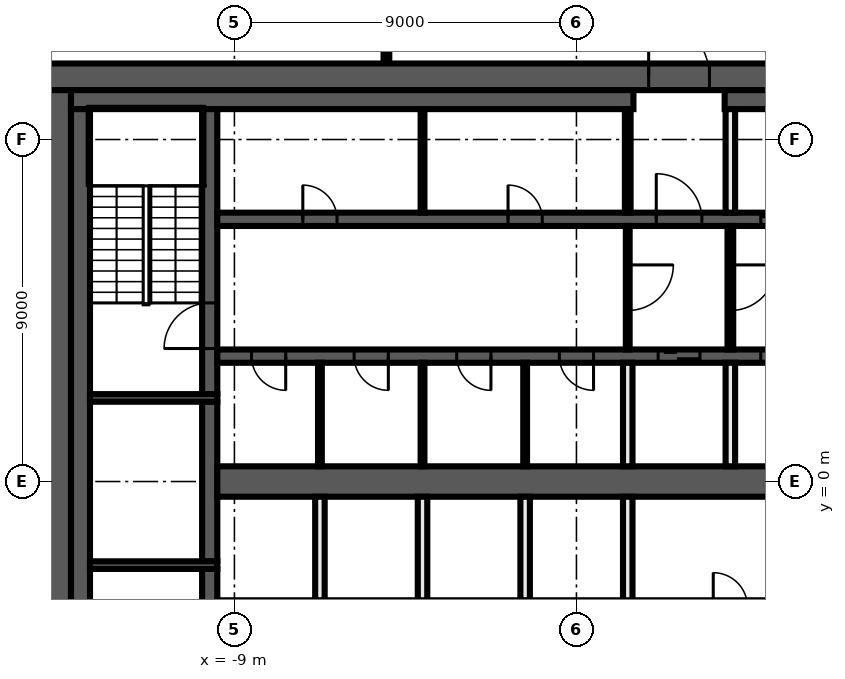
"""IFC4 building model, lengths in metres.
Left out: names, types, materials, properties, quantities, classifications, styles, units other than length and angle.
Written with IfcOpenShell. Run it as: python <this file> out.ifc"""

import sys

from ifc_helpers import new_model, si_unit, direction, frame, frame_2d, origin, place, context, subcontext, project, spatial, rectangle, extrude, element, fill, save


model = new_model("IFC4")
c1 = context("Model", 3, precision=1e-05, world=origin(), true_north=direction((0.0, 1.0)))
c2 = subcontext(c1, "Body", "Model", "MODEL_VIEW")
j1 = project(units=[si_unit("LENGTHUNIT", "METRE"), si_unit("PLANEANGLEUNIT", "RADIAN")], contexts=[c1])
p1 = place(None, origin())
s1 = spatial("IfcSite", under=j1, at=p1, CompositionType="ELEMENT")
p2 = place(p1, origin())
s2 = spatial("IfcBuilding", under=s1, at=p2, CompositionType="ELEMENT")
p3 = place(p2, frame((0.0, 0.0, 266.4)))
s3 = spatial("IfcBuildingStorey", under=s2, at=p3, CompositionType="ELEMENT", Elevation=266.4)
p4 = place(p3, frame((-5.0, 11.0, 0.0), z_axis=(0.0, 0.0, 1.0), x_axis=(0.0, 1.0, 0.0)))
e1 = element("IfcWall", 1, at=p4, inside=s3, PredefinedType="PARTITIONING", context=c2, shape_type="SweptSolid", body=[
    extrude(rectangle(XDim=3.125, YDim=0.15, at=frame_2d((1.562, 0.0))), origin(), (0.0, 0.0, 1.0), 3.82),
])
p5 = place(p3, frame((-14.0, 10.65, 0.0), z_axis=(0.0, 0.0, 1.0), x_axis=(1.0, 0.0, 0.0)))
e2 = element("IfcWall", 2, at=p5, inside=s3, PredefinedType="SHEAR", context=c2, shape_type="SweptSolid", body=[
    extrude(rectangle(XDim=28.0, YDim=0.7, at=frame_2d((14.0, 0.0))), origin(), (0.0, 0.0, 1.0), 3.82),
])
p6 = place(p5, frame((15.9, 0.0, 0.0)))
e3 = element("IfcOpeningElement", 3, at=p6, cuts=e2, PredefinedType="OPENING", context=c2, shape_type="SweptSolid", body=[
    extrude(rectangle(XDim=1.6, YDim=2.1, at=frame_2d((0.8, 1.05))), frame((0.0, 0.36, 0.0), z_axis=(0.0, -1.0, 0.0), x_axis=(1.0, 0.0, 0.0)), (0.0, 0.0, 1.0), 0.72),
])
p7 = place(p3, frame((-13.65, -10.3, 0.0), z_axis=(0.0, 0.0, 1.0), x_axis=(0.0, 1.0, 0.0)))
e4 = element("IfcWall", 4, at=p7, inside=s3, PredefinedType="SHEAR", context=c2, shape_type="SweptSolid", body=[
    extrude(rectangle(XDim=20.6, YDim=0.7, at=frame_2d((10.3, 0.0))), origin(), (0.0, 0.0, 1.0), 3.82),
])
p8 = place(p3, frame((-13.3, 10.05, 0.0), z_axis=(0.0, 0.0, 1.0), x_axis=(1.0, 0.0, 0.0)))
e5 = element("IfcWall", 5, at=p8, inside=s3, PredefinedType="SHEAR", context=c2, shape_type="SweptSolid", body=[
    extrude(rectangle(XDim=14.8, YDim=0.5, at=frame_2d((7.4, 0.0))), origin(), (0.0, 0.0, 1.0), 3.82),
])
p9 = place(p3, frame((3.9, 10.05, 0.0), z_axis=(0.0, 0.0, 1.0), x_axis=(1.0, 0.0, 0.0)))
e6 = element("IfcWall", 6, at=p9, inside=s3, PredefinedType="SHEAR", context=c2, shape_type="SweptSolid", body=[
    extrude(rectangle(XDim=9.4, YDim=0.5, at=frame_2d((4.7, 0.0))), origin(), (0.0, 0.0, 1.0), 3.82),
])
p10 = place(p3, frame((-13.05, -9.8, 0.0), z_axis=(0.0, 0.0, 1.0), x_axis=(0.0, 1.0, 0.0)))
e7 = element("IfcWall", 7, at=p10, inside=s3, PredefinedType="SHEAR", context=c2, shape_type="SweptSolid", body=[
    extrude(rectangle(XDim=19.6, YDim=0.5, at=frame_2d((9.8, 0.0))), origin(), (0.0, 0.0, 1.0), 3.82),
])
p11 = place(p3, frame((-9.65, -9.8, 0.0), z_axis=(0.0, 0.0, 1.0), x_axis=(0.0, 1.0, 0.0)))
e8 = element("IfcWall", 8, at=p11, inside=s3, PredefinedType="SHEAR", context=c2, shape_type="SweptSolid", body=[
    extrude(rectangle(XDim=7.5, YDim=0.4, at=frame_2d((3.75, 0.0))), origin(), (0.0, 0.0, 1.0), 3.82),
])
p12 = place(p11, frame((5.1, 0.0, 0.0)))
e9 = element("IfcOpeningElement", 9, at=p12, cuts=e8, PredefinedType="OPENING", context=c2, shape_type="SweptSolid", body=[
    extrude(rectangle(XDim=1.2, YDim=2.1, at=frame_2d((0.6, 1.05))), frame((0.0, 0.21, 0.0), z_axis=(0.0, -1.0, 0.0), x_axis=(1.0, 0.0, 0.0)), (0.0, 0.0, 1.0), 0.42),
])
p13 = place(p3, frame((-9.65, -2.1, 0.0), z_axis=(0.0, 0.0, 1.0), x_axis=(0.0, 1.0, 0.0)))
e10 = element("IfcWall", 10, at=p13, inside=s3, PredefinedType="SHEAR", context=c2, shape_type="SweptSolid", body=[
    extrude(rectangle(XDim=4.2, YDim=0.4, at=frame_2d((2.1, 0.0))), origin(), (0.0, 0.0, 1.0), 3.82),
])
p14 = place(p3, frame((-9.65, 2.3, 0.0), z_axis=(0.0, 0.0, 1.0), x_axis=(0.0, 1.0, 0.0)))
e11 = element("IfcWall", 11, at=p14, inside=s3, PredefinedType="SHEAR", context=c2, shape_type="SweptSolid", body=[
    extrude(rectangle(XDim=7.5, YDim=0.4, at=frame_2d((3.75, 0.0))), origin(), (0.0, 0.0, 1.0), 3.82),
])
p15 = place(p14, frame((1.2, 0.0, 0.0)))
e12 = element("IfcOpeningElement", 12, at=p15, cuts=e11, PredefinedType="OPENING", context=c2, shape_type="SweptSolid", body=[
    extrude(rectangle(XDim=1.2, YDim=2.1, at=frame_2d((0.6, 1.05))), frame((0.0, 0.21, 0.0), z_axis=(0.0, -1.0, 0.0), x_axis=(1.0, 0.0, 0.0)), (0.0, 0.0, 1.0), 0.42),
])
for number, where, z_axis, x_axis in (
    (13, (-9.45, 2.2, 0.0), (0.0, 0.0, 1.0), (-1.0, 0.0, 0.0)),
    (14, (-9.45, -2.2, 0.0), (0.0, 0.0, 1.0), (-1.0, 0.0, 0.0)),
):
    element("IfcWall", number, at=place(p3, frame(where, z_axis=z_axis, x_axis=x_axis)), inside=s3, PredefinedType="SHEAR", context=c2, shape_type="SweptSolid", body=[
        extrude(rectangle(XDim=3.35, YDim=0.2, at=frame_2d((1.675, 0.0))), origin(), (0.0, 0.0, 1.0), 3.82),
    ])
p16 = place(p3, frame((-9.45, 6.9, 0.0), z_axis=(0.0, 0.0, 1.0), x_axis=(1.0, 0.0, 0.0)))
e15 = element("IfcWall", 15, at=p16, inside=s3, PredefinedType="SHEAR", context=c2, shape_type="SweptSolid", body=[
    extrude(rectangle(XDim=18.9, YDim=0.35, at=frame_2d((9.45, 0.0))), origin(), (0.0, 0.0, 1.0), 3.82),
])
p17 = place(p16, frame((11.55, 0.0, 0.0)))
e16 = element("IfcOpeningElement", 16, at=p17, cuts=e15, PredefinedType="OPENING", context=c2, shape_type="SweptSolid", body=[
    extrude(rectangle(XDim=1.2, YDim=2.1, at=frame_2d((0.6, 1.05))), frame((0.0, 0.185, 0.0), z_axis=(0.0, -1.0, 0.0), x_axis=(1.0, 0.0, 0.0)), (0.0, 0.0, 1.0), 0.37),
])
p18 = place(p16, frame((14.3, 0.0, 0.0)))
e17 = element("IfcOpeningElement", 17, at=p18, cuts=e15, PredefinedType="OPENING", context=c2, shape_type="SweptSolid", body=[
    extrude(rectangle(XDim=1.1, YDim=2.1, at=frame_2d((0.55, 1.05))), frame((0.0, 0.185, 0.0), z_axis=(0.0, -1.0, 0.0), x_axis=(1.0, 0.0, 0.0)), (0.0, 0.0, 1.0), 0.37),
])
p19 = place(p16, frame((17.0, 0.0, 0.0)))
e18 = element("IfcOpeningElement", 18, at=p19, cuts=e15, PredefinedType="OPENING", context=c2, shape_type="SweptSolid", body=[
    extrude(rectangle(XDim=1.1, YDim=2.1, at=frame_2d((0.55, 1.05))), frame((0.0, 0.185, 0.0), z_axis=(0.0, -1.0, 0.0), x_axis=(1.0, 0.0, 0.0)), (0.0, 0.0, 1.0), 0.37),
])
p20 = place(p16, frame((2.25, 0.0, 0.0)))
e19 = element("IfcOpeningElement", 19, at=p20, cuts=e15, PredefinedType="OPENING", context=c2, shape_type="SweptSolid", body=[
    extrude(rectangle(XDim=0.9, YDim=2.1, at=frame_2d((0.45, 1.05))), frame((0.0, 0.185, 0.0), z_axis=(0.0, -1.0, 0.0), x_axis=(1.0, 0.0, 0.0)), (0.0, 0.0, 1.0), 0.37),
])
p21 = place(p16, frame((7.65, 0.0, 0.0)))
e20 = element("IfcOpeningElement", 20, at=p21, cuts=e15, PredefinedType="OPENING", context=c2, shape_type="SweptSolid", body=[
    extrude(rectangle(XDim=0.9, YDim=2.1, at=frame_2d((0.45, 1.05))), frame((0.0, 0.185, 0.0), z_axis=(0.0, -1.0, 0.0), x_axis=(1.0, 0.0, 0.0)), (0.0, 0.0, 1.0), 0.37),
])
p22 = place(p3, frame((9.45, 3.3, 0.0), z_axis=(0.0, 0.0, 1.0), x_axis=(-1.0, 0.0, 0.0)))
e21 = element("IfcWall", 21, at=p22, inside=s3, PredefinedType="SHEAR", context=c2, shape_type="SweptSolid", body=[
    extrude(rectangle(XDim=18.9, YDim=0.35, at=frame_2d((9.45, 0.0))), origin(), (0.0, 0.0, 1.0), 3.82),
])
p23 = place(p22, frame((6.2, 0.0, 0.0)))
e22 = element("IfcOpeningElement", 22, at=p23, cuts=e21, PredefinedType="OPENING", context=c2, shape_type="SweptSolid", body=[
    extrude(rectangle(XDim=1.1, YDim=2.1, at=frame_2d((0.55, 1.05))), frame((0.0, 0.185, 0.0), z_axis=(0.0, -1.0, 0.0), x_axis=(1.0, 0.0, 0.0)), (0.0, 0.0, 1.0), 0.37),
])
p24 = place(p22, frame((3.5, 0.0, 0.0)))
e23 = element("IfcOpeningElement", 23, at=p24, cuts=e21, PredefinedType="OPENING", context=c2, shape_type="SweptSolid", body=[
    extrude(rectangle(XDim=1.1, YDim=2.1, at=frame_2d((0.55, 1.05))), frame((0.0, 0.185, 0.0), z_axis=(0.0, -1.0, 0.0), x_axis=(1.0, 0.0, 0.0)), (0.0, 0.0, 1.0), 0.37),
])
p25 = place(p22, frame((0.9, 0.0, 0.0)))
e24 = element("IfcOpeningElement", 24, at=p25, cuts=e21, PredefinedType="OPENING", context=c2, shape_type="SweptSolid", body=[
    extrude(rectangle(XDim=0.9, YDim=2.1, at=frame_2d((0.45, 1.05))), frame((0.0, 0.185, 0.0), z_axis=(0.0, -1.0, 0.0), x_axis=(1.0, 0.0, 0.0)), (0.0, 0.0, 1.0), 0.37),
])
p26 = place(p22, frame((17.1, 0.0, 0.0)))
e25 = element("IfcOpeningElement", 25, at=p26, cuts=e21, PredefinedType="OPENING", context=c2, shape_type="SweptSolid", body=[
    extrude(rectangle(XDim=0.9, YDim=2.1, at=frame_2d((0.45, 1.05))), frame((0.0, 0.185, 0.0), z_axis=(0.0, -1.0, 0.0), x_axis=(1.0, 0.0, 0.0)), (0.0, 0.0, 1.0), 0.37),
])
p27 = place(p22, frame((14.4, 0.0, 0.0)))
e26 = element("IfcOpeningElement", 26, at=p27, cuts=e21, PredefinedType="OPENING", context=c2, shape_type="SweptSolid", body=[
    extrude(rectangle(XDim=0.9, YDim=2.1, at=frame_2d((0.45, 1.05))), frame((0.0, 0.185, 0.0), z_axis=(0.0, -1.0, 0.0), x_axis=(1.0, 0.0, 0.0)), (0.0, 0.0, 1.0), 0.37),
])
p28 = place(p22, frame((11.7, 0.0, 0.0)))
e27 = element("IfcOpeningElement", 27, at=p28, cuts=e21, PredefinedType="OPENING", context=c2, shape_type="SweptSolid", body=[
    extrude(rectangle(XDim=0.9, YDim=2.1, at=frame_2d((0.45, 1.05))), frame((0.0, 0.185, 0.0), z_axis=(0.0, -1.0, 0.0), x_axis=(1.0, 0.0, 0.0)), (0.0, 0.0, 1.0), 0.37),
])
p29 = place(p22, frame((9.0, 0.0, 0.0)))
e28 = element("IfcOpeningElement", 28, at=p29, cuts=e21, PredefinedType="OPENING", context=c2, shape_type="SweptSolid", body=[
    extrude(rectangle(XDim=0.9, YDim=2.1, at=frame_2d((0.45, 1.05))), frame((0.0, 0.185, 0.0), z_axis=(0.0, -1.0, 0.0), x_axis=(1.0, 0.0, 0.0)), (0.0, 0.0, 1.0), 0.37),
])
p30 = place(p3, frame((-9.45, 0.0, 0.0), z_axis=(0.0, 0.0, 1.0), x_axis=(1.0, 0.0, 0.0)))
e29 = element("IfcWall", 29, at=p30, inside=s3, PredefinedType="SHEAR", context=c2, shape_type="SweptSolid", body=[
    extrude(rectangle(XDim=18.9, YDim=0.8, at=frame_2d((9.45, 0.0))), origin(), (0.0, 0.0, 1.0), 3.82),
])
p31 = place(p3, frame((4.05, 6.725, 0.0), z_axis=(0.0, 0.0, 1.0), x_axis=(0.0, -1.0, 0.0)))
e30 = element("IfcWall", 30, at=p31, inside=s3, PredefinedType="PARTITIONING", context=c2, shape_type="SweptSolid", body=[
    extrude(rectangle(XDim=3.25, YDim=0.15, at=frame_2d((1.625, 0.0))), origin(), (0.0, 0.0, 1.0), 3.82),
])
p32 = place(p31, frame((1.025, 0.0, 0.0)))
e31 = element("IfcOpeningElement", 31, at=p32, cuts=e30, PredefinedType="OPENING", context=c2, shape_type="SweptSolid", body=[
    extrude(rectangle(XDim=1.2, YDim=2.1, at=frame_2d((0.6, 1.05))), frame((0.0, 0.085, 0.0), z_axis=(0.0, -1.0, 0.0), x_axis=(1.0, 0.0, 0.0)), (0.0, 0.0, 1.0), 0.17),
])
for number, where, z_axis, x_axis in (
    (32, (4.05, 0.4, 0.0), (0.0, 0.0, 1.0), (0.0, 1.0, 0.0)),
    (33, (4.05, 7.075, 0.0), (0.0, 0.0, 1.0), (0.0, 1.0, 0.0)),
):
    element("IfcWall", number, at=place(p3, frame(where, z_axis=z_axis, x_axis=x_axis)), inside=s3, PredefinedType="SOLIDWALL", context=c2, shape_type="SweptSolid", body=[
        extrude(rectangle(XDim=2.725, YDim=0.25, at=frame_2d((1.363, 0.0))), origin(), (0.0, 0.0, 1.0), 3.82),
    ])
p33 = place(p3, frame((1.35, 7.075, 0.0), z_axis=(0.0, 0.0, 1.0), x_axis=(0.0, 1.0, 0.0)))
e34 = element("IfcWall", 34, at=p33, inside=s3, PredefinedType="PARTITIONING", context=c2, shape_type="SweptSolid", body=[
    extrude(rectangle(XDim=2.725, YDim=0.15, at=frame_2d((1.363, 0.0))), origin(), (0.0, 0.0, 1.0), 3.82),
])
p34 = place(p3, frame((1.35, 6.725, 0.0), z_axis=(0.0, 0.0, 1.0), x_axis=(0.0, -1.0, 0.0)))
e35 = element("IfcWall", 35, at=p34, inside=s3, PredefinedType="PARTITIONING", context=c2, shape_type="SweptSolid", body=[
    extrude(rectangle(XDim=3.25, YDim=0.1, at=frame_2d((1.625, 0.0))), origin(), (0.0, 0.0, 1.0), 3.82),
])
p35 = place(p34, frame((1.025, 0.0, 0.0)))
e36 = element("IfcOpeningElement", 36, at=p35, cuts=e35, PredefinedType="OPENING", context=c2, shape_type="SweptSolid", body=[
    extrude(rectangle(XDim=1.2, YDim=2.1, at=frame_2d((0.6, 1.05))), frame((0.0, 0.06, 0.0), z_axis=(0.0, -1.0, 0.0), x_axis=(1.0, 0.0, 0.0)), (0.0, 0.0, 1.0), 0.12),
])
for number, where, z_axis, x_axis in (
    (37, (1.35, -3.125, 0.0), (0.0, 0.0, 1.0), (0.0, 1.0, 0.0)),
    (38, (1.35, 0.4, 0.0), (0.0, 0.0, 1.0), (0.0, 1.0, 0.0)),
):
    element("IfcWall", number, at=place(p3, frame(where, z_axis=z_axis, x_axis=x_axis)), inside=s3, PredefinedType="SOLIDWALL", context=c2, shape_type="SweptSolid", body=[
        extrude(rectangle(XDim=2.725, YDim=0.25, at=frame_2d((1.363, 0.0))), origin(), (0.0, 0.0, 1.0), 3.82),
    ])
p36 = place(p3, frame((-1.35, 0.4, 0.0), z_axis=(0.0, 0.0, 1.0), x_axis=(0.0, 1.0, 0.0)))
e39 = element("IfcWall", 39, at=p36, inside=s3, PredefinedType="PARTITIONING", context=c2, shape_type="SweptSolid", body=[
    extrude(rectangle(XDim=2.725, YDim=0.1, at=frame_2d((1.363, 0.0))), origin(), (0.0, 0.0, 1.0), 3.82),
])
p37 = place(p3, frame((-1.35, -3.125, 0.0), z_axis=(0.0, 0.0, 1.0), x_axis=(0.0, 1.0, 0.0)))
e40 = element("IfcWall", 40, at=p37, inside=s3, PredefinedType="SOLIDWALL", context=c2, shape_type="SweptSolid", body=[
    extrude(rectangle(XDim=2.725, YDim=0.25, at=frame_2d((1.363, 0.0))), origin(), (0.0, 0.0, 1.0), 3.82),
])
for number, where, z_axis, x_axis in (
    (41, (-4.05, 0.4, 0.0), (0.0, 0.0, 1.0), (0.0, 1.0, 0.0)),
    (42, (-4.05, 7.075, 0.0), (0.0, 0.0, 1.0), (0.0, 1.0, 0.0)),
):
    element("IfcWall", number, at=place(p3, frame(where, z_axis=z_axis, x_axis=x_axis)), inside=s3, PredefinedType="PARTITIONING", context=c2, shape_type="SweptSolid", body=[
        extrude(rectangle(XDim=2.725, YDim=0.1, at=frame_2d((1.363, 0.0))), origin(), (0.0, 0.0, 1.0), 3.82),
    ])
p38 = place(p3, frame((-4.05, -3.125, 0.0), z_axis=(0.0, 0.0, 1.0), x_axis=(0.0, 1.0, 0.0)))
e43 = element("IfcWall", 43, at=p38, inside=s3, PredefinedType="SOLIDWALL", context=c2, shape_type="SweptSolid", body=[
    extrude(rectangle(XDim=2.725, YDim=0.25, at=frame_2d((1.363, 0.0))), origin(), (0.0, 0.0, 1.0), 3.82),
])
p39 = place(p3, frame((-6.75, 0.4, 0.0), z_axis=(0.0, 0.0, 1.0), x_axis=(0.0, 1.0, 0.0)))
e44 = element("IfcWall", 44, at=p39, inside=s3, PredefinedType="PARTITIONING", context=c2, shape_type="SweptSolid", body=[
    extrude(rectangle(XDim=2.725, YDim=0.1, at=frame_2d((1.363, 0.0))), origin(), (0.0, 0.0, 1.0), 3.82),
])
p40 = place(p3, frame((-6.75, -3.125, 0.0), z_axis=(0.0, 0.0, 1.0), x_axis=(0.0, 1.0, 0.0)))
e45 = element("IfcWall", 45, at=p40, inside=s3, PredefinedType="SOLIDWALL", context=c2, shape_type="SweptSolid", body=[
    extrude(rectangle(XDim=2.725, YDim=0.25, at=frame_2d((1.363, 0.0))), origin(), (0.0, 0.0, 1.0), 3.82),
])
p41 = place(p6, origin())
e46 = element("IfcDoor", 46, at=p41, inside=s3, OperationType="DOUBLE_DOOR_SINGLE_SWING", PredefinedType="DOOR", context=c2, shape_type="SweptSolid", body=[
    extrude(rectangle(XDim=1.6, YDim=2.1, at=frame_2d((0.8, 1.05))), frame((0.0, 0.025, 0.0), z_axis=(0.0, -1.0, 0.0), x_axis=(1.0, 0.0, 0.0)), (0.0, 0.0, 1.0), 0.05),
])
fill(e3, e46)
p42 = place(p17, origin())
e47 = element("IfcDoor", 47, at=p42, inside=s3, OperationType="SINGLE_SWING_LEFT", PredefinedType="DOOR", context=c2, shape_type="SweptSolid", body=[
    extrude(rectangle(XDim=1.2, YDim=2.1, at=frame_2d((0.6, 1.05))), frame((0.0, 0.025, 0.0), z_axis=(0.0, -1.0, 0.0), x_axis=(1.0, 0.0, 0.0)), (0.0, 0.0, 1.0), 0.05),
])
fill(e16, e47)
p43 = place(p18, origin())
e48 = element("IfcDoor", 48, at=p43, inside=s3, OperationType="DOUBLE_DOOR_SLIDING", PredefinedType="DOOR", context=c2, shape_type="SweptSolid", body=[
    extrude(rectangle(XDim=1.1, YDim=2.1, at=frame_2d((0.55, 1.05))), frame((0.0, 0.025, 0.0), z_axis=(0.0, -1.0, 0.0), x_axis=(1.0, 0.0, 0.0)), (0.0, 0.0, 1.0), 0.05),
])
fill(e17, e48)
p44 = place(p23, origin())
e49 = element("IfcDoor", 49, at=p44, inside=s3, OperationType="DOUBLE_DOOR_SLIDING", PredefinedType="DOOR", context=c2, shape_type="SweptSolid", body=[
    extrude(rectangle(XDim=1.1, YDim=2.1, at=frame_2d((0.55, 1.05))), frame((0.0, 0.025, 0.0), z_axis=(0.0, -1.0, 0.0), x_axis=(1.0, 0.0, 0.0)), (0.0, 0.0, 1.0), 0.05),
])
fill(e22, e49)
p45 = place(p24, origin())
e50 = element("IfcDoor", 50, at=p45, inside=s3, OperationType="DOUBLE_DOOR_SLIDING", PredefinedType="DOOR", context=c2, shape_type="SweptSolid", body=[
    extrude(rectangle(XDim=1.1, YDim=2.1, at=frame_2d((0.55, 1.05))), frame((0.0, 0.025, 0.0), z_axis=(0.0, -1.0, 0.0), x_axis=(1.0, 0.0, 0.0)), (0.0, 0.0, 1.0), 0.05),
])
fill(e23, e50)
p46 = place(p20, origin())
e51 = element("IfcDoor", 51, at=p46, inside=s3, OperationType="SINGLE_SWING_RIGHT", PredefinedType="DOOR", context=c2, shape_type="SweptSolid", body=[
    extrude(rectangle(XDim=0.9, YDim=2.1, at=frame_2d((0.45, 1.05))), frame((0.0, 0.025, 0.0), z_axis=(0.0, -1.0, 0.0), x_axis=(1.0, 0.0, 0.0)), (0.0, 0.0, 1.0), 0.05),
])
fill(e19, e51)
p47 = place(p21, origin())
e52 = element("IfcDoor", 52, at=p47, inside=s3, OperationType="SINGLE_SWING_LEFT", PredefinedType="DOOR", context=c2, shape_type="SweptSolid", body=[
    extrude(rectangle(XDim=0.9, YDim=2.1, at=frame_2d((0.45, 1.05))), frame((0.0, 0.025, 0.0), z_axis=(0.0, -1.0, 0.0), x_axis=(1.0, 0.0, 0.0)), (0.0, 0.0, 1.0), 0.05),
])
fill(e20, e52)
p48 = place(p26, origin())
e53 = element("IfcDoor", 53, at=p48, inside=s3, OperationType="SINGLE_SWING_RIGHT", PredefinedType="DOOR", context=c2, shape_type="SweptSolid", body=[
    extrude(rectangle(XDim=0.9, YDim=2.1, at=frame_2d((0.45, 1.05))), frame((0.0, 0.025, 0.0), z_axis=(0.0, -1.0, 0.0), x_axis=(1.0, 0.0, 0.0)), (0.0, 0.0, 1.0), 0.05),
])
fill(e25, e53)
p49 = place(p27, origin())
e54 = element("IfcDoor", 54, at=p49, inside=s3, OperationType="SINGLE_SWING_LEFT", PredefinedType="DOOR", context=c2, shape_type="SweptSolid", body=[
    extrude(rectangle(XDim=0.9, YDim=2.1, at=frame_2d((0.45, 1.05))), frame((0.0, 0.025, 0.0), z_axis=(0.0, -1.0, 0.0), x_axis=(1.0, 0.0, 0.0)), (0.0, 0.0, 1.0), 0.05),
])
fill(e26, e54)
p50 = place(p28, origin())
e55 = element("IfcDoor", 55, at=p50, inside=s3, OperationType="SINGLE_SWING_RIGHT", PredefinedType="DOOR", context=c2, shape_type="SweptSolid", body=[
    extrude(rectangle(XDim=0.9, YDim=2.1, at=frame_2d((0.45, 1.05))), frame((0.0, 0.025, 0.0), z_axis=(0.0, -1.0, 0.0), x_axis=(1.0, 0.0, 0.0)), (0.0, 0.0, 1.0), 0.05),
])
fill(e27, e55)
p51 = place(p29, origin())
e56 = element("IfcDoor", 56, at=p51, inside=s3, OperationType="SINGLE_SWING_LEFT", PredefinedType="DOOR", context=c2, shape_type="SweptSolid", body=[
    extrude(rectangle(XDim=0.9, YDim=2.1, at=frame_2d((0.45, 1.05))), frame((0.0, 0.025, 0.0), z_axis=(0.0, -1.0, 0.0), x_axis=(1.0, 0.0, 0.0)), (0.0, 0.0, 1.0), 0.05),
])
fill(e28, e56)
p52 = place(p15, origin())
e57 = element("IfcDoor", 57, at=p52, inside=s3, OperationType="SINGLE_SWING_RIGHT", PredefinedType="DOOR", context=c2, shape_type="SweptSolid", body=[
    extrude(rectangle(XDim=1.2, YDim=2.1, at=frame_2d((0.6, 1.05))), frame((0.0, 0.025, 0.0), z_axis=(0.0, -1.0, 0.0), x_axis=(1.0, 0.0, 0.0)), (0.0, 0.0, 1.0), 0.05),
])
fill(e12, e57)
p53 = place(p35, origin())
e58 = element("IfcDoor", 58, at=p53, inside=s3, OperationType="SINGLE_SWING_LEFT", PredefinedType="DOOR", context=c2, shape_type="SweptSolid", body=[
    extrude(rectangle(XDim=1.2, YDim=2.1, at=frame_2d((0.6, 1.05))), frame((0.0, 0.025, 0.0), z_axis=(0.0, -1.0, 0.0), x_axis=(1.0, 0.0, 0.0)), (0.0, 0.0, 1.0), 0.05),
])
fill(e36, e58)
p54 = place(p32, origin())
e59 = element("IfcDoor", 59, at=p54, inside=s3, OperationType="SINGLE_SWING_RIGHT", PredefinedType="DOOR", context=c2, shape_type="SweptSolid", body=[
    extrude(rectangle(XDim=1.2, YDim=2.1, at=frame_2d((0.6, 1.05))), frame((0.0, 0.025, 0.0), z_axis=(0.0, -1.0, 0.0), x_axis=(1.0, 0.0, 0.0)), (0.0, 0.0, 1.0), 0.05),
])
fill(e31, e59)
save(model, sys.argv[1])
